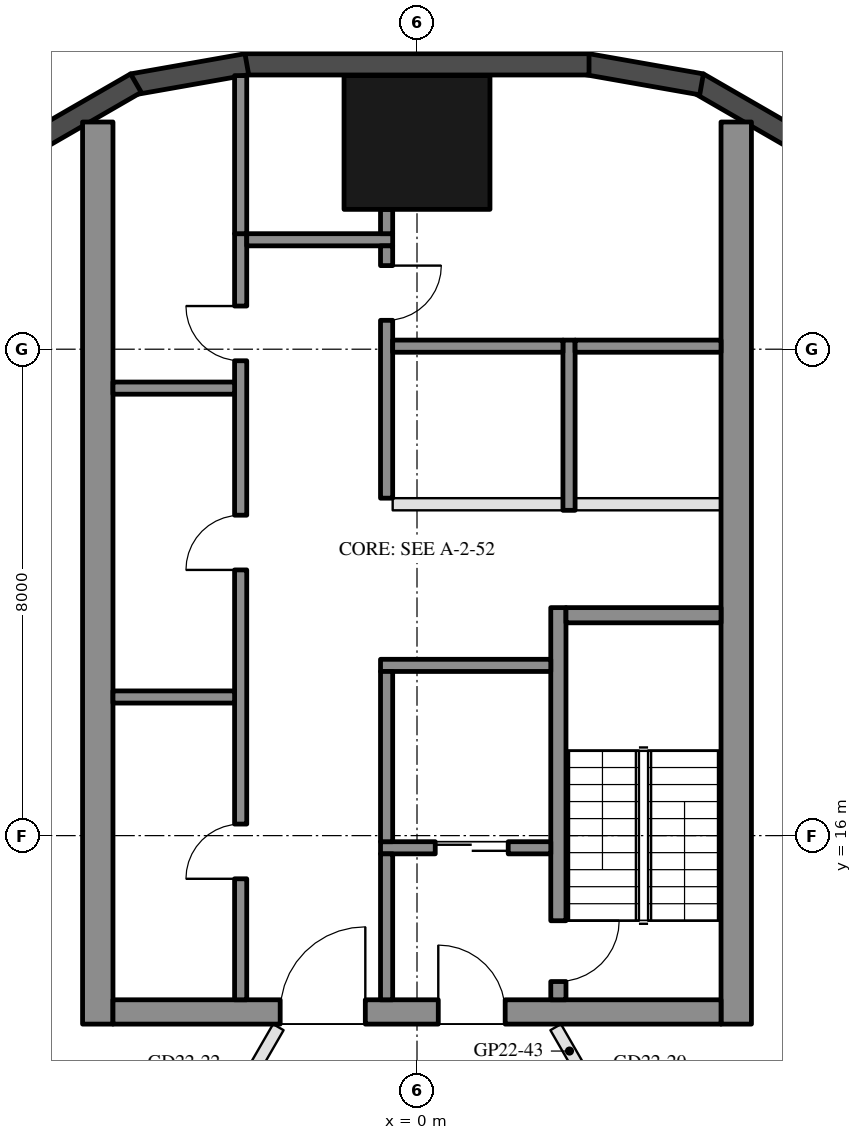
"""IFC4 building model, lengths in metres.
Left out: names, types, materials, properties, quantities, classifications, styles, units other than length and angle.
Written with IfcOpenShell. Run it as: python <this file> out.ifc"""

import sys

from ifc_helpers import new_model, si_unit, direction, frame, frame_2d, origin, origin_2d, place, context, subcontext, project, spatial, rectangle, hollow_rectangle, extrude, element, fill, save


model = new_model("IFC4")
c1 = context("Model", 3, precision=1e-05, world=origin(), true_north=direction((0.0, 1.0)))
c2 = subcontext(c1, "Body", "Model", "MODEL_VIEW")
j1 = project(units=[si_unit("LENGTHUNIT", "METRE"), si_unit("PLANEANGLEUNIT", "RADIAN")], contexts=[c1])
p1 = place(None, origin())
s1 = spatial("IfcSite", under=j1, at=p1, CompositionType="ELEMENT")
p2 = place(p1, origin())
s2 = spatial("IfcBuilding", under=s1, at=p2, CompositionType="ELEMENT")
p3 = place(p2, frame((0.0, 0.0, 224.3)))
s3 = spatial("IfcBuildingStorey", under=s2, at=p3, CompositionType="ELEMENT", Elevation=224.3)
p4 = place(p3, frame((0.0, 27.4, 0.0), z_axis=(0.0, 0.0, 1.0), x_axis=(1.0, 0.0, 0.0)))
e1 = element("IfcColumn", 1, at=p4, inside=s3, PredefinedType="COLUMN", context=c2, shape_type="SweptSolid", body=[
    extrude(hollow_rectangle(XDim=2.4, YDim=2.2, WallThickness=0.06, at=origin_2d()), origin(), (0.0, 0.0, 1.0), 3.7),
])
for number, where, z_axis, x_axis in (
    (2, (6.277, 27.422, 0.0), (0.0, 0.0, 1.0), (-0.866, 0.5, 0.0)),
    (3, (4.68, 28.356, 0.0), (0.0, 0.0, 1.0), (-0.985, 0.174, 0.0)),
):
    element("IfcWall", number, at=place(p3, frame(where, z_axis=z_axis, x_axis=x_axis)), inside=s3, PredefinedType="SOLIDWALL", context=c2, shape_type="SweptSolid", body=[
        extrude(rectangle(XDim=1.91, YDim=0.35, at=frame_2d((0.955, 0.0))), origin(), (0.0, 0.0, 1.0), 3.55),
    ])
p5 = place(p3, frame((2.829, 28.685, 0.0), z_axis=(0.0, 0.0, 1.0), x_axis=(-1.0, 0.0, 0.0)))
e4 = element("IfcWall", 4, at=p5, inside=s3, PredefinedType="SOLIDWALL", context=c2, shape_type="SweptSolid", body=[
    extrude(rectangle(XDim=5.658, YDim=0.35, at=frame_2d((2.829, 0.0))), origin(), (0.0, 0.0, 1.0), 3.55),
])
for number, where, z_axis, x_axis in (
    (5, (-2.799, 28.688, 0.0), (0.0, 0.0, 1.0), (-0.985, -0.174, 0.0)),
    (6, (-4.623, 28.377, 0.0), (0.0, 0.0, 1.0), (-0.866, -0.5, 0.0)),
):
    element("IfcWall", number, at=place(p3, frame(where, z_axis=z_axis, x_axis=x_axis)), inside=s3, PredefinedType="SOLIDWALL", context=c2, shape_type="SweptSolid", body=[
        extrude(rectangle(XDim=1.91, YDim=0.35, at=frame_2d((0.955, 0.0))), origin(), (0.0, 0.0, 1.0), 3.55),
    ])
for number, where, z_axis, x_axis in (
    (7, (5.25, 12.9, 0.0), (0.0, 0.0, 1.0), (0.0, 1.0, 0.0)),
    (8, (-5.25, 12.9, 0.0), (0.0, 0.0, 1.0), (0.0, 1.0, 0.0)),
):
    element("IfcWall", number, at=place(p3, frame(where, z_axis=z_axis, x_axis=x_axis)), inside=s3, PredefinedType="SHEAR", context=c2, shape_type="SweptSolid", body=[
        extrude(rectangle(XDim=14.837, YDim=0.5, at=frame_2d((7.418, 0.0))), origin(), (0.0, 0.0, 1.0), 3.5),
    ])
p6 = place(p3, frame((5.0, 13.1, 0.0), z_axis=(0.0, 0.0, 1.0), x_axis=(-1.0, 0.0, 0.0)))
e9 = element("IfcWall", 9, at=p6, inside=s3, PredefinedType="SHEAR", context=c2, shape_type="SweptSolid", body=[
    extrude(rectangle(XDim=10.0, YDim=0.4, at=frame_2d((5.0, 0.0))), origin(), (0.0, 0.0, 1.0), 3.5),
])
p7 = place(p6, frame((3.55, 0.0, 0.0)))
e10 = element("IfcOpeningElement", 10, at=p7, cuts=e9, PredefinedType="OPENING", context=c2, shape_type="SweptSolid", body=[
    extrude(rectangle(XDim=1.1, YDim=2.1, at=frame_2d((0.55, 1.05))), frame((0.0, 0.21, 0.0), z_axis=(0.0, -1.0, 0.0), x_axis=(1.0, 0.0, 0.0)), (0.0, 0.0, 1.0), 0.42),
])
p8 = place(p6, frame((5.85, 0.0, 0.0)))
e11 = element("IfcOpeningElement", 11, at=p8, cuts=e9, PredefinedType="OPENING", context=c2, shape_type="SweptSolid", body=[
    extrude(rectangle(XDim=1.4, YDim=2.1, at=frame_2d((0.7, 1.05))), frame((0.0, 0.21, 0.0), z_axis=(0.0, -1.0, 0.0), x_axis=(1.0, 0.0, 0.0)), (0.0, 0.0, 1.0), 0.42),
])
p9 = place(p3, frame((2.325, 13.3, 0.0), z_axis=(0.0, 0.0, 1.0), x_axis=(0.0, 1.0, 0.0)))
e12 = element("IfcWall", 12, at=p9, inside=s3, PredefinedType="SHEAR", context=c2, shape_type="SweptSolid", body=[
    extrude(rectangle(XDim=6.45, YDim=0.25, at=frame_2d((3.225, 0.0))), origin(), (0.0, 0.0, 1.0), 3.5),
])
p10 = place(p9, frame((0.3, 0.0, 0.0)))
e13 = element("IfcOpeningElement", 13, at=p10, cuts=e12, PredefinedType="OPENING", context=c2, shape_type="SweptSolid", body=[
    extrude(rectangle(XDim=1.0, YDim=2.1, at=frame_2d((0.5, 1.05))), frame((0.0, 0.135, 0.0), z_axis=(0.0, -1.0, 0.0), x_axis=(1.0, 0.0, 0.0)), (0.0, 0.0, 1.0), 0.27),
])
p11 = place(p3, frame((5.0, 19.625, 0.0), z_axis=(0.0, 0.0, 1.0), x_axis=(-1.0, 0.0, 0.0)))
e14 = element("IfcWall", 14, at=p11, inside=s3, PredefinedType="SHEAR", context=c2, shape_type="SweptSolid", body=[
    extrude(rectangle(XDim=2.55, YDim=0.25, at=frame_2d((1.275, 0.0))), origin(), (0.0, 0.0, 1.0), 3.5),
])
p12 = place(p3, frame((2.2, 18.8, 0.0), z_axis=(0.0, 0.0, 1.0), x_axis=(-1.0, 0.0, 0.0)))
e15 = element("IfcWall", 15, at=p12, inside=s3, PredefinedType="SHEAR", context=c2, shape_type="SweptSolid", body=[
    extrude(rectangle(XDim=2.8, YDim=0.2, at=frame_2d((1.4, 0.0))), origin(), (0.0, 0.0, 1.0), 3.5),
])
p13 = place(p3, frame((2.2, 15.8, 0.0), z_axis=(0.0, 0.0, 1.0), x_axis=(-1.0, 0.0, 0.0)))
e16 = element("IfcWall", 16, at=p13, inside=s3, PredefinedType="SHEAR", context=c2, shape_type="SweptSolid", body=[
    extrude(rectangle(XDim=2.8, YDim=0.2, at=frame_2d((1.4, 0.0))), origin(), (0.0, 0.0, 1.0), 3.5),
])
p14 = place(p13, frame((0.7, 0.0, 0.0)))
e17 = element("IfcOpeningElement", 17, at=p14, cuts=e16, PredefinedType="OPENING", context=c2, shape_type="SweptSolid", body=[
    extrude(rectangle(XDim=1.2, YDim=2.1, at=frame_2d((0.6, 1.05))), frame((0.0, 0.11, 0.0), z_axis=(0.0, -1.0, 0.0), x_axis=(1.0, 0.0, 0.0)), (0.0, 0.0, 1.0), 0.22),
])
p15 = place(p3, frame((-0.5, 15.9, 0.0), z_axis=(0.0, 0.0, 1.0), x_axis=(0.0, 1.0, 0.0)))
e18 = element("IfcWall", 18, at=p15, inside=s3, PredefinedType="SHEAR", context=c2, shape_type="SweptSolid", body=[
    extrude(rectangle(XDim=2.8, YDim=0.2, at=frame_2d((1.4, 0.0))), origin(), (0.0, 0.0, 1.0), 3.5),
])
p16 = place(p3, frame((-0.5, 13.3, 0.0), z_axis=(0.0, 0.0, 1.0), x_axis=(0.0, 1.0, 0.0)))
e19 = element("IfcWall", 19, at=p16, inside=s3, PredefinedType="SHEAR", context=c2, shape_type="SweptSolid", body=[
    extrude(rectangle(XDim=2.4, YDim=0.2, at=frame_2d((1.2, 0.0))), origin(), (0.0, 0.0, 1.0), 3.5),
])
p17 = place(p3, frame((-2.9, 13.3, 0.0), z_axis=(0.0, 0.0, 1.0), x_axis=(0.0, 1.0, 0.0)))
e20 = element("IfcWall", 20, at=p17, inside=s3, PredefinedType="SHEAR", context=c2, shape_type="SweptSolid", body=[
    extrude(rectangle(XDim=12.6, YDim=0.2, at=frame_2d((6.3, 0.0))), origin(), (0.0, 0.0, 1.0), 3.5),
])
p18 = place(p17, frame((1.99, 0.0, 0.0)))
e21 = element("IfcOpeningElement", 21, at=p18, cuts=e20, PredefinedType="OPENING", context=c2, shape_type="SweptSolid", body=[
    extrude(rectangle(XDim=0.9, YDim=2.1, at=frame_2d((0.45, 1.05))), frame((0.0, 0.11, 0.0), z_axis=(0.0, -1.0, 0.0), x_axis=(1.0, 0.0, 0.0)), (0.0, 0.0, 1.0), 0.22),
])
p19 = place(p17, frame((7.07, 0.0, 0.0)))
e22 = element("IfcOpeningElement", 22, at=p19, cuts=e20, PredefinedType="OPENING", context=c2, shape_type="SweptSolid", body=[
    extrude(rectangle(XDim=0.9, YDim=2.1, at=frame_2d((0.45, 1.05))), frame((0.0, 0.11, 0.0), z_axis=(0.0, -1.0, 0.0), x_axis=(1.0, 0.0, 0.0)), (0.0, 0.0, 1.0), 0.22),
])
p20 = place(p17, frame((10.51, 0.0, 0.0)))
e23 = element("IfcOpeningElement", 23, at=p20, cuts=e20, PredefinedType="OPENING", context=c2, shape_type="SweptSolid", body=[
    extrude(rectangle(XDim=0.9, YDim=2.1, at=frame_2d((0.45, 1.05))), frame((0.0, 0.11, 0.0), z_axis=(0.0, -1.0, 0.0), x_axis=(1.0, 0.0, 0.0)), (0.0, 0.0, 1.0), 0.22),
])
p21 = place(p3, frame((-0.4, 25.8, 0.0), z_axis=(0.0, 0.0, 1.0), x_axis=(-1.0, 0.0, 0.0)))
e24 = element("IfcWall", 24, at=p21, inside=s3, PredefinedType="SHEAR", context=c2, shape_type="SweptSolid", body=[
    extrude(rectangle(XDim=2.4, YDim=0.2, at=frame_2d((1.2, 0.0))), origin(), (0.0, 0.0, 1.0), 3.5),
])
p22 = place(p3, frame((-0.5, 21.55, 0.0), z_axis=(0.0, 0.0, 1.0), x_axis=(0.0, 1.0, 0.0)))
e25 = element("IfcWall", 25, at=p22, inside=s3, PredefinedType="SHEAR", context=c2, shape_type="SweptSolid", body=[
    extrude(rectangle(XDim=4.15, YDim=0.2, at=frame_2d((2.075, 0.0))), origin(), (0.0, 0.0, 1.0), 3.5),
])
p23 = place(p22, frame((2.925, 0.0, 0.0)))
e26 = element("IfcOpeningElement", 26, at=p23, cuts=e25, PredefinedType="OPENING", context=c2, shape_type="SweptSolid", body=[
    extrude(rectangle(XDim=0.9, YDim=2.1, at=frame_2d((0.45, 1.05))), frame((0.0, 0.11, 0.0), z_axis=(0.0, -1.0, 0.0), x_axis=(1.0, 0.0, 0.0)), (0.0, 0.0, 1.0), 0.22),
])
for number, where, z_axis, x_axis in (
    (27, (-3.0, 18.28, 0.0), (0.0, 0.0, 1.0), (-1.0, 0.0, 0.0)),
    (28, (-3.0, 23.36, 0.0), (0.0, 0.0, 1.0), (-1.0, 0.0, 0.0)),
):
    element("IfcWall", number, at=place(p3, frame(where, z_axis=z_axis, x_axis=x_axis)), inside=s3, PredefinedType="SHEAR", context=c2, shape_type="SweptSolid", body=[
        extrude(rectangle(XDim=2.0, YDim=0.2, at=frame_2d((1.0, 0.0))), origin(), (0.0, 0.0, 1.0), 3.5),
    ])
p24 = place(p3, frame((-0.5, 25.9, 0.0), z_axis=(0.0, 0.0, 1.0), x_axis=(0.0, 1.0, 0.0)))
e29 = element("IfcWall", 29, at=p24, inside=s3, PredefinedType="SHEAR", context=c2, shape_type="SweptSolid", body=[
    extrude(rectangle(XDim=0.4, YDim=0.2, at=frame_2d((0.2, 0.0))), origin(), (0.0, 0.0, 1.0), 3.5),
])
p25 = place(p3, frame((-2.9, 25.9, 0.0), z_axis=(0.0, 0.0, 1.0), x_axis=(0.0, 1.0, 0.0)))
e30 = element("IfcWall", 30, at=p25, inside=s3, PredefinedType="SHEAR", context=c2, shape_type="SweptSolid", body=[
    extrude(rectangle(XDim=2.6, YDim=0.2, at=frame_2d((1.3, 0.0))), origin(), (0.0, 0.0, 1.0), 3.5),
])
p26 = place(p3, frame((2.5, 21.35, 0.0), z_axis=(0.0, 0.0, 1.0), x_axis=(0.0, 1.0, 0.0)))
e31 = element("IfcWall", 31, at=p26, inside=s3, PredefinedType="SHEAR", context=c2, shape_type="SweptSolid", body=[
    extrude(rectangle(XDim=2.8, YDim=0.2, at=frame_2d((1.4, 0.0))), origin(), (0.0, 0.0, 1.0), 3.5),
])
p27 = place(p3, frame((5.0, 24.05, 0.0), z_axis=(0.0, 0.0, 1.0), x_axis=(-1.0, 0.0, 0.0)))
e32 = element("IfcWall", 32, at=p27, inside=s3, PredefinedType="SHEAR", context=c2, shape_type="SweptSolid", body=[
    extrude(rectangle(XDim=2.4, YDim=0.2, at=frame_2d((1.2, 0.0))), origin(), (0.0, 0.0, 1.0), 3.5),
])
p28 = place(p3, frame((2.4, 24.05, 0.0), z_axis=(0.0, 0.0, 1.0), x_axis=(-1.0, 0.0, 0.0)))
e33 = element("IfcWall", 33, at=p28, inside=s3, PredefinedType="SHEAR", context=c2, shape_type="SweptSolid", body=[
    extrude(rectangle(XDim=2.8, YDim=0.2, at=frame_2d((1.4, 0.0))), origin(), (0.0, 0.0, 1.0), 3.5),
])
p29 = place(p3, frame((5.0, 21.45, 0.0), z_axis=(0.0, 0.0, 1.0), x_axis=(-1.0, 0.0, 0.0)))
e34 = element("IfcWall", 34, at=p29, inside=s3, PredefinedType="PARTITIONING", context=c2, shape_type="SweptSolid", body=[
    extrude(rectangle(XDim=2.4, YDim=0.2, at=frame_2d((1.2, 0.0))), origin(), (0.0, 0.0, 1.0), 3.5),
])
p30 = place(p3, frame((2.4, 21.45, 0.0), z_axis=(0.0, 0.0, 1.0), x_axis=(-1.0, 0.0, 0.0)))
e35 = element("IfcWall", 35, at=p30, inside=s3, PredefinedType="PARTITIONING", context=c2, shape_type="SweptSolid", body=[
    extrude(rectangle(XDim=2.8, YDim=0.2, at=frame_2d((1.4, 0.0))), origin(), (0.0, 0.0, 1.0), 3.5),
])
p31 = place(p3, frame((13.952, 14.395, 0.0), z_axis=(0.0, 0.0, 1.0), x_axis=(-0.892890171934, -0.450274517226, 0.0)))
e36 = element("IfcWall", 36, at=p31, inside=s3, PredefinedType="PARTITIONING", context=c2, shape_type="SweptSolid", body=[
    extrude(rectangle(XDim=10.998, YDim=0.2, at=frame_2d((5.499, 0.0))), origin(), (0.0, 0.0, 1.0), 3.06),
])
p32 = place(p3, frame((-13.427, 13.504, 0.0), z_axis=(0.0, 0.0, 1.0), x_axis=(0.916759471343, -0.399439697204, 0.0)))
e37 = element("IfcWall", 37, at=p32, inside=s3, PredefinedType="PARTITIONING", context=c2, shape_type="SweptSolid", body=[
    extrude(rectangle(XDim=10.144, YDim=0.2, at=frame_2d((5.072, 0.0))), origin(), (0.0, 0.0, 1.0), 3.06),
])
p33 = place(p3, frame((2.281, 12.85, 0.0), z_axis=(0.0, 0.0, 1.0), x_axis=(0.499985062256, -0.866034027923, 0.0)))
e38 = element("IfcWall", 38, at=p33, inside=s3, PredefinedType="PARTITIONING", context=c2, shape_type="SweptSolid", body=[
    extrude(rectangle(XDim=3.782, YDim=0.2, at=frame_2d((1.891, 0.0))), origin(), (0.0, 0.0, 1.0), 2.95),
])
p34 = place(p33, frame((1.391, 0.0, 0.0)))
e39 = element("IfcOpeningElement", 39, at=p34, cuts=e38, PredefinedType="OPENING", context=c2, shape_type="SweptSolid", body=[
    extrude(rectangle(XDim=1.0, YDim=2.1, at=frame_2d((0.5, 1.05))), frame((0.0, 0.11, 0.0), z_axis=(0.0, -1.0, 0.0), x_axis=(1.0, 0.0, 0.0)), (0.0, 0.0, 1.0), 0.22),
])
p35 = place(p3, frame((-4.169, 9.58, 0.0), z_axis=(0.0, 0.0, 1.0), x_axis=(0.499991068497, 0.866030560329, 0.0)))
e40 = element("IfcWall", 40, at=p35, inside=s3, PredefinedType="PARTITIONING", context=c2, shape_type="SweptSolid", body=[
    extrude(rectangle(XDim=3.776, YDim=0.2, at=frame_2d((1.888, 0.0))), origin(), (0.0, 0.0, 1.0), 2.95),
])
p36 = place(p35, frame((1.388, 0.0, 0.0)))
e41 = element("IfcOpeningElement", 41, at=p36, cuts=e40, PredefinedType="OPENING", context=c2, shape_type="SweptSolid", body=[
    extrude(rectangle(XDim=1.0, YDim=2.1, at=frame_2d((0.5, 1.05))), frame((0.0, 0.11, 0.0), z_axis=(0.0, -1.0, 0.0), x_axis=(1.0, 0.0, 0.0)), (0.0, 0.0, 1.0), 0.22),
])
p37 = place(p14, origin())
e42 = element("IfcDoor", 42, at=p37, inside=s3, OperationType="DOUBLE_DOOR_SLIDING", PredefinedType="DOOR", context=c2, shape_type="SweptSolid", body=[
    extrude(rectangle(XDim=1.2, YDim=2.1, at=frame_2d((0.6, 1.05))), frame((0.0, 0.025, 0.0), z_axis=(0.0, -1.0, 0.0), x_axis=(1.0, 0.0, 0.0)), (0.0, 0.0, 1.0), 0.05),
])
fill(e17, e42)
p38 = place(p18, origin())
e43 = element("IfcDoor", 43, at=p38, inside=s3, OperationType="SINGLE_SWING_LEFT", PredefinedType="DOOR", context=c2, shape_type="SweptSolid", body=[
    extrude(rectangle(XDim=0.9, YDim=2.1, at=frame_2d((0.45, 1.05))), frame((0.0, 0.025, 0.0), z_axis=(0.0, -1.0, 0.0), x_axis=(1.0, 0.0, 0.0)), (0.0, 0.0, 1.0), 0.05),
])
fill(e21, e43)
p39 = place(p19, origin())
e44 = element("IfcDoor", 44, at=p39, inside=s3, OperationType="SINGLE_SWING_LEFT", PredefinedType="DOOR", context=c2, shape_type="SweptSolid", body=[
    extrude(rectangle(XDim=0.9, YDim=2.1, at=frame_2d((0.45, 1.05))), frame((0.0, 0.025, 0.0), z_axis=(0.0, -1.0, 0.0), x_axis=(1.0, 0.0, 0.0)), (0.0, 0.0, 1.0), 0.05),
])
fill(e22, e44)
p40 = place(p20, origin())
e45 = element("IfcDoor", 45, at=p40, inside=s3, OperationType="SINGLE_SWING_RIGHT", PredefinedType="DOOR", context=c2, shape_type="SweptSolid", body=[
    extrude(rectangle(XDim=0.9, YDim=2.1, at=frame_2d((0.45, 1.05))), frame((0.0, 0.025, 0.0), z_axis=(0.0, -1.0, 0.0), x_axis=(1.0, 0.0, 0.0)), (0.0, 0.0, 1.0), 0.05),
])
fill(e23, e45)
p41 = place(p23, frame((0.9, 0.0, 0.0), z_axis=(0.0, 0.0, 1.0), x_axis=(-1.0, 0.0, 0.0)))
e46 = element("IfcDoor", 46, at=p41, inside=s3, OperationType="SINGLE_SWING_LEFT", PredefinedType="DOOR", context=c2, shape_type="SweptSolid", body=[
    extrude(rectangle(XDim=0.9, YDim=2.1, at=frame_2d((0.45, 1.05))), frame((0.0, 0.025, 0.0), z_axis=(0.0, -1.0, 0.0), x_axis=(1.0, 0.0, 0.0)), (0.0, 0.0, 1.0), 0.05),
])
fill(e26, e46)
p42 = place(p7, frame((1.1, 0.0, 0.0), z_axis=(0.0, 0.0, 1.0), x_axis=(-1.0, 0.0, 0.0)))
e47 = element("IfcDoor", 47, at=p42, inside=s3, OperationType="SINGLE_SWING_LEFT", PredefinedType="DOOR", context=c2, shape_type="SweptSolid", body=[
    extrude(rectangle(XDim=1.1, YDim=2.1, at=frame_2d((0.55, 1.05))), frame((0.0, 0.025, 0.0), z_axis=(0.0, -1.0, 0.0), x_axis=(1.0, 0.0, 0.0)), (0.0, 0.0, 1.0), 0.05),
])
fill(e10, e47)
p43 = place(p8, frame((1.4, 0.0, 0.0), z_axis=(0.0, 0.0, 1.0), x_axis=(-1.0, 0.0, 0.0)))
e48 = element("IfcDoor", 48, at=p43, inside=s3, OperationType="DOUBLE_DOOR_SINGLE_SWING", PredefinedType="DOOR", context=c2, shape_type="SweptSolid", body=[
    extrude(rectangle(XDim=1.4, YDim=2.1, at=frame_2d((0.7, 1.05))), frame((0.0, 0.025, 0.0), z_axis=(0.0, -1.0, 0.0), x_axis=(1.0, 0.0, 0.0)), (0.0, 0.0, 1.0), 0.05),
])
fill(e11, e48)
p44 = place(p10, frame((1.0, 0.0, 0.0), z_axis=(0.0, 0.0, 1.0), x_axis=(-1.0, 0.0, 0.0)))
e49 = element("IfcDoor", 49, at=p44, inside=s3, OperationType="SINGLE_SWING_LEFT", PredefinedType="DOOR", context=c2, shape_type="SweptSolid", body=[
    extrude(rectangle(XDim=1.0, YDim=2.1, at=frame_2d((0.5, 1.05))), frame((0.0, 0.025, 0.0), z_axis=(0.0, -1.0, 0.0), x_axis=(1.0, 0.0, 0.0)), (0.0, 0.0, 1.0), 0.05),
])
fill(e13, e49)
save(model, sys.argv[1])
